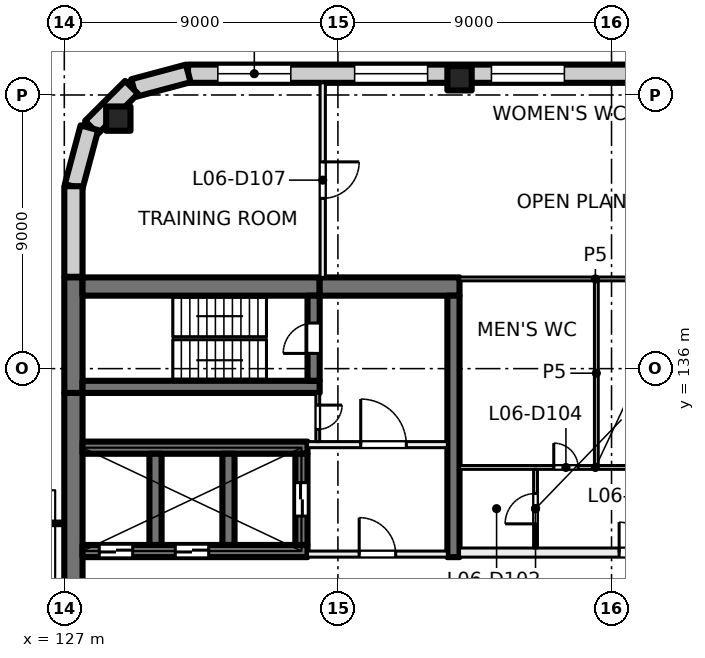
"""IFC4 building model, lengths in metres.
Left out: names, types, materials, properties, quantities, classifications, styles, units other than length and angle.
Written with IfcOpenShell. Run it as: python <this file> out.ifc"""

import sys

from ifc_helpers import new_model, si_unit, direction, frame, frame_2d, origin, origin_2d, place, context, subcontext, project, spatial, rectangle, extrude, element, fill, save


model = new_model("IFC4")
c1 = context("Model", 3, precision=1e-05, world=origin(), true_north=direction((0.0, 1.0)))
c2 = subcontext(c1, "Body", "Model", "MODEL_VIEW")
j1 = project(units=[si_unit("LENGTHUNIT", "METRE"), si_unit("PLANEANGLEUNIT", "RADIAN")], contexts=[c1])
p1 = place(None, origin())
s1 = spatial("IfcSite", under=j1, at=p1, CompositionType="ELEMENT")
p2 = place(p1, origin())
s2 = spatial("IfcBuilding", under=s1, at=p2, CompositionType="ELEMENT")
p3 = place(p2, frame((0.0, 0.0, 31.5)))
s3 = spatial("IfcBuildingStorey", under=s2, at=p3, CompositionType="ELEMENT", Elevation=31.5)
for number, where, z_axis, x_axis in (
    (1, (128.777, 144.223, 0.0), (0.0, 0.0, 1.0), (1.0, 0.0, 0.0)),
    (2, (140.0, 145.55, 0.0), (0.0, 0.0, 1.0), (1.0, 0.0, 0.0)),
):
    element("IfcColumn", number, at=place(p3, frame(where, z_axis=z_axis, x_axis=x_axis)), inside=s3, PredefinedType="COLUMN", context=c2, shape_type="SweptSolid", body=[
        extrude(rectangle(XDim=0.8, YDim=0.8, at=origin_2d()), origin(), (0.0, 0.0, 1.0), 4.0),
    ])
p4 = place(p3, frame((127.3, 120.8, 0.0), z_axis=(0.0, 0.0, 1.0), x_axis=(0.0, 1.0, 0.0)))
e3 = element("IfcWall", 3, at=p4, inside=s3, PredefinedType="SHEAR", context=c2, shape_type="SweptSolid", body=[
    extrude(rectangle(XDim=14.4, YDim=0.6, at=frame_2d((7.2, 0.0))), origin(), (0.0, 0.0, 1.0), 4.0),
])
p5 = place(p4, frame((6.3, 0.0, 0.0)))
e4 = element("IfcOpeningElement", 4, at=p5, cuts=e3, PredefinedType="OPENING", context=c2, shape_type="SweptSolid", body=[
    extrude(rectangle(XDim=1.8, YDim=2.1, at=frame_2d((0.9, 1.05))), frame((0.0, 0.31, 0.0), z_axis=(0.0, -1.0, 0.0), x_axis=(1.0, 0.0, 0.0)), (0.0, 0.0, 1.0), 0.62),
])
p6 = place(p3, frame((127.3, 135.2, 0.0), z_axis=(0.0, 0.0, 1.0), x_axis=(0.0, 1.0, 0.0)))
e5 = element("IfcWall", 5, at=p6, inside=s3, PredefinedType="SHEAR", context=c2, shape_type="SweptSolid", body=[
    extrude(rectangle(XDim=3.8, YDim=0.6, at=frame_2d((1.9, 0.0))), origin(), (0.0, 0.0, 1.0), 4.0),
])
p7 = place(p3, frame((127.6, 138.7, 0.0), z_axis=(0.0, 0.0, 1.0), x_axis=(1.0, 0.0, 0.0)))
e6 = element("IfcWall", 6, at=p7, inside=s3, PredefinedType="SHEAR", context=c2, shape_type="SweptSolid", body=[
    extrude(rectangle(XDim=7.8, YDim=0.6, at=frame_2d((3.9, 0.0))), origin(), (0.0, 0.0, 1.0), 4.0),
])
p8 = place(p3, frame((135.4, 138.7, 0.0), z_axis=(0.0, 0.0, 1.0), x_axis=(1.0, 0.0, 0.0)))
e7 = element("IfcWall", 7, at=p8, inside=s3, PredefinedType="SHEAR", context=c2, shape_type="SweptSolid", body=[
    extrude(rectangle(XDim=4.6, YDim=0.6, at=frame_2d((2.3, 0.0))), origin(), (0.0, 0.0, 1.0), 4.0),
])
p9 = place(p3, frame((127.6, 135.4, 0.0), z_axis=(0.0, 0.0, 1.0), x_axis=(1.0, 0.0, 0.0)))
e8 = element("IfcWall", 8, at=p9, inside=s3, PredefinedType="SHEAR", context=c2, shape_type="SweptSolid", body=[
    extrude(rectangle(XDim=7.8, YDim=0.4, at=frame_2d((3.9, 0.0))), origin(), (0.0, 0.0, 1.0), 4.0),
])
p10 = place(p3, frame((135.2, 135.6, 0.0), z_axis=(0.0, 0.0, 1.0), x_axis=(0.0, 1.0, 0.0)))
e9 = element("IfcWall", 9, at=p10, inside=s3, PredefinedType="SHEAR", context=c2, shape_type="SweptSolid", body=[
    extrude(rectangle(XDim=2.8, YDim=0.4, at=frame_2d((1.4, 0.0))), origin(), (0.0, 0.0, 1.0), 4.0),
])
p11 = place(p10, frame((0.9, 0.0, 0.0)))
e10 = element("IfcOpeningElement", 10, at=p11, cuts=e9, PredefinedType="OPENING", context=c2, shape_type="SweptSolid", body=[
    extrude(rectangle(XDim=1.0, YDim=2.1, at=frame_2d((0.5, 1.05))), frame((0.0, 0.21, 0.0), z_axis=(0.0, -1.0, 0.0), x_axis=(1.0, 0.0, 0.0)), (0.0, 0.0, 1.0), 0.42),
])
p12 = place(p3, frame((127.6, 130.0, 0.0), z_axis=(0.0, 0.0, 1.0), x_axis=(1.0, 0.0, 0.0)))
e11 = element("IfcWall", 11, at=p12, inside=s3, PredefinedType="SHEAR", context=c2, shape_type="SweptSolid", body=[
    extrude(rectangle(XDim=7.4, YDim=0.4, at=frame_2d((3.7, 0.0))), origin(), (0.0, 0.0, 1.0), 4.0),
])
p13 = place(p12, frame((0.55, 0.0, 0.0)))
e12 = element("IfcOpeningElement", 12, at=p13, cuts=e11, PredefinedType="OPENING", context=c2, shape_type="SweptSolid", body=[
    extrude(rectangle(XDim=1.1, YDim=2.1, at=frame_2d((0.55, 1.05))), frame((0.0, 0.21, 0.0), z_axis=(0.0, -1.0, 0.0), x_axis=(1.0, 0.0, 0.0)), (0.0, 0.0, 1.0), 0.42),
])
p14 = place(p12, frame((3.05, 0.0, 0.0)))
e13 = element("IfcOpeningElement", 13, at=p14, cuts=e11, PredefinedType="OPENING", context=c2, shape_type="SweptSolid", body=[
    extrude(rectangle(XDim=1.1, YDim=2.1, at=frame_2d((0.55, 1.05))), frame((0.0, 0.21, 0.0), z_axis=(0.0, -1.0, 0.0), x_axis=(1.0, 0.0, 0.0)), (0.0, 0.0, 1.0), 0.42),
])
p15 = place(p3, frame((127.6, 133.4, 0.0), z_axis=(0.0, 0.0, 1.0), x_axis=(1.0, 0.0, 0.0)))
e14 = element("IfcWall", 14, at=p15, inside=s3, PredefinedType="SHEAR", context=c2, shape_type="SweptSolid", body=[
    extrude(rectangle(XDim=7.4, YDim=0.4, at=frame_2d((3.7, 0.0))), origin(), (0.0, 0.0, 1.0), 4.0),
])
for number, where, z_axis, x_axis in (
    (15, (130.0, 130.2, 0.0), (0.0, 0.0, 1.0), (0.0, 1.0, 0.0)),
    (16, (132.4, 130.2, 0.0), (0.0, 0.0, 1.0), (0.0, 1.0, 0.0)),
):
    element("IfcWall", number, at=place(p3, frame(where, z_axis=z_axis, x_axis=x_axis)), inside=s3, PredefinedType="SHEAR", context=c2, shape_type="SweptSolid", body=[
        extrude(rectangle(XDim=3.0, YDim=0.4, at=frame_2d((1.5, 0.0))), origin(), (0.0, 0.0, 1.0), 4.0),
    ])
p16 = place(p3, frame((134.8, 130.2, 0.0), z_axis=(0.0, 0.0, 1.0), x_axis=(0.0, 1.0, 0.0)))
e17 = element("IfcWall", 17, at=p16, inside=s3, PredefinedType="SHEAR", context=c2, shape_type="SweptSolid", body=[
    extrude(rectangle(XDim=3.0, YDim=0.4, at=frame_2d((1.5, 0.0))), origin(), (0.0, 0.0, 1.0), 4.0),
])
p17 = place(p16, frame((0.95, 0.0, 0.0)))
e18 = element("IfcOpeningElement", 18, at=p17, cuts=e17, PredefinedType="OPENING", context=c2, shape_type="SweptSolid", body=[
    extrude(rectangle(XDim=1.1, YDim=2.1, at=frame_2d((0.55, 1.05))), frame((0.0, 0.21, 0.0), z_axis=(0.0, -1.0, 0.0), x_axis=(1.0, 0.0, 0.0)), (0.0, 0.0, 1.0), 0.42),
])
p18 = place(p3, frame((139.8, 129.8, 0.0), z_axis=(0.0, 0.0, 1.0), x_axis=(0.0, 1.0, 0.0)))
e19 = element("IfcWall", 19, at=p18, inside=s3, PredefinedType="SHEAR", context=c2, shape_type="SweptSolid", body=[
    extrude(rectangle(XDim=8.6, YDim=0.4, at=frame_2d((4.3, 0.0))), origin(), (0.0, 0.0, 1.0), 4.0),
])
p19 = place(p3, frame((131.07, 145.7, 0.0), z_axis=(0.0, 0.0, 1.0), x_axis=(1.0, 0.0, 0.0)))
e20 = element("IfcWall", 20, at=p19, inside=s3, PredefinedType="SOLIDWALL", context=c2, shape_type="SweptSolid", body=[
    extrude(rectangle(XDim=31.93, YDim=0.6, at=frame_2d((15.965, 0.0))), origin(), (0.0, 0.0, 1.0), 3.625),
])
p20 = place(p19, frame((0.98, 0.0, 0.9)))
e21 = element("IfcOpeningElement", 21, at=p20, cuts=e20, PredefinedType="OPENING", context=c2, shape_type="SweptSolid", body=[
    extrude(rectangle(XDim=2.4, YDim=2.4, at=frame_2d((1.2, 1.2))), frame((0.0, 0.31, 0.0), z_axis=(0.0, -1.0, 0.0), x_axis=(1.0, 0.0, 0.0)), (0.0, 0.0, 1.0), 0.62),
])
p21 = place(p19, frame((5.48, 0.0, 0.9)))
e22 = element("IfcOpeningElement", 22, at=p21, cuts=e20, PredefinedType="OPENING", context=c2, shape_type="SweptSolid", body=[
    extrude(rectangle(XDim=2.4, YDim=2.4, at=frame_2d((1.2, 1.2))), frame((0.0, 0.31, 0.0), z_axis=(0.0, -1.0, 0.0), x_axis=(1.0, 0.0, 0.0)), (0.0, 0.0, 1.0), 0.62),
])
p22 = place(p19, frame((9.98, 0.0, 0.9)))
e23 = element("IfcOpeningElement", 23, at=p22, cuts=e20, PredefinedType="OPENING", context=c2, shape_type="SweptSolid", body=[
    extrude(rectangle(XDim=2.4, YDim=2.4, at=frame_2d((1.2, 1.2))), frame((0.0, 0.31, 0.0), z_axis=(0.0, -1.0, 0.0), x_axis=(1.0, 0.0, 0.0)), (0.0, 0.0, 1.0), 0.62),
])
p23 = place(p19, frame((14.48, 0.0, 0.9)))
e24 = element("IfcOpeningElement", 24, at=p23, cuts=e20, PredefinedType="OPENING", context=c2, shape_type="SweptSolid", body=[
    extrude(rectangle(XDim=2.4, YDim=2.4, at=frame_2d((1.2, 1.2))), frame((0.0, 0.31, 0.0), z_axis=(0.0, -1.0, 0.0), x_axis=(1.0, 0.0, 0.0)), (0.0, 0.0, 1.0), 0.62),
])
p24 = place(p19, frame((18.98, 0.0, 0.9)))
e25 = element("IfcOpeningElement", 25, at=p24, cuts=e20, PredefinedType="OPENING", context=c2, shape_type="SweptSolid", body=[
    extrude(rectangle(XDim=2.4, YDim=2.4, at=frame_2d((1.2, 1.2))), frame((0.0, 0.31, 0.0), z_axis=(0.0, -1.0, 0.0), x_axis=(1.0, 0.0, 0.0)), (0.0, 0.0, 1.0), 0.62),
])
p25 = place(p19, frame((23.48, 0.0, 0.9)))
e26 = element("IfcOpeningElement", 26, at=p25, cuts=e20, PredefinedType="OPENING", context=c2, shape_type="SweptSolid", body=[
    extrude(rectangle(XDim=2.4, YDim=2.4, at=frame_2d((1.2, 1.2))), frame((0.0, 0.31, 0.0), z_axis=(0.0, -1.0, 0.0), x_axis=(1.0, 0.0, 0.0)), (0.0, 0.0, 1.0), 0.62),
])
p26 = place(p19, frame((27.98, 0.0, 0.9)))
e27 = element("IfcOpeningElement", 27, at=p26, cuts=e20, PredefinedType="OPENING", context=c2, shape_type="SweptSolid", body=[
    extrude(rectangle(XDim=2.4, YDim=2.4, at=frame_2d((1.2, 1.2))), frame((0.0, 0.31, 0.0), z_axis=(0.0, -1.0, 0.0), x_axis=(1.0, 0.0, 0.0)), (0.0, 0.0, 1.0), 0.62),
])
for number, where, z_axis, x_axis in (
    (28, (129.281, 145.229, 0.0), (0.0, 0.0, 1.0), (0.966, 0.259, 0.0)),
    (29, (127.896, 143.936, 0.0), (0.0, 0.0, 1.0), (0.707, 0.707, 0.0)),
):
    element("IfcWall", number, at=place(p3, frame(where, z_axis=z_axis, x_axis=x_axis)), inside=s3, PredefinedType="SOLIDWALL", context=c2, shape_type="SweptSolid", body=[
        extrude(rectangle(XDim=1.861, YDim=0.6, at=frame_2d((0.93, 0.0))), origin(), (0.0, 0.0, 1.0), 3.625),
    ])
p27 = place(p3, frame((127.308, 141.99, 0.0), z_axis=(0.0, 0.0, 1.0), x_axis=(0.258839784042, 0.965920269068, 0.0)))
e30 = element("IfcWall", 30, at=p27, inside=s3, PredefinedType="SOLIDWALL", context=c2, shape_type="SweptSolid", body=[
    extrude(rectangle(XDim=2.0, YDim=0.6, at=frame_2d((1.0, 0.0))), origin(), (0.0, 0.0, 1.0), 3.625),
])
p28 = place(p3, frame((127.3, 139.02, 0.0), z_axis=(0.0, 0.0, 1.0), x_axis=(0.0, 1.0, 0.0)))
e31 = element("IfcWall", 31, at=p28, inside=s3, PredefinedType="SOLIDWALL", context=c2, shape_type="SweptSolid", body=[
    extrude(rectangle(XDim=2.98, YDim=0.6, at=frame_2d((1.49, 0.0))), origin(), (0.0, 0.0, 1.0), 3.625),
])
p29 = place(p3, frame((135.0, 129.9, 0.0), z_axis=(0.0, 0.0, 1.0), x_axis=(1.0, 0.0, 0.0)))
e32 = element("IfcWall", 32, at=p29, inside=s3, PredefinedType="PARTITIONING", context=c2, shape_type="SweptSolid", body=[
    extrude(rectangle(XDim=4.6, YDim=0.2, at=frame_2d((2.3, 0.0))), origin(), (0.0, 0.0, 1.0), 3.625),
])
p30 = place(p29, frame((1.7, 0.0, 0.0)))
e33 = element("IfcOpeningElement", 33, at=p30, cuts=e32, PredefinedType="OPENING", context=c2, shape_type="SweptSolid", body=[
    extrude(rectangle(XDim=1.2, YDim=2.1, at=frame_2d((0.6, 1.05))), frame((0.0, 0.11, 0.0), z_axis=(0.0, -1.0, 0.0), x_axis=(1.0, 0.0, 0.0)), (0.0, 0.0, 1.0), 0.22),
])
p31 = place(p3, frame((135.0, 133.5, 0.0), z_axis=(0.0, 0.0, 1.0), x_axis=(1.0, 0.0, 0.0)))
e34 = element("IfcWall", 34, at=p31, inside=s3, PredefinedType="PARTITIONING", context=c2, shape_type="SweptSolid", body=[
    extrude(rectangle(XDim=4.6, YDim=0.2, at=frame_2d((2.3, 0.0))), origin(), (0.0, 0.0, 1.0), 3.625),
])
p32 = place(p31, frame((1.75, 0.0, 0.0)))
e35 = element("IfcOpeningElement", 35, at=p32, cuts=e34, PredefinedType="OPENING", context=c2, shape_type="SweptSolid", body=[
    extrude(rectangle(XDim=1.5, YDim=2.1, at=frame_2d((0.75, 1.05))), frame((0.0, 0.11, 0.0), z_axis=(0.0, -1.0, 0.0), x_axis=(1.0, 0.0, 0.0)), (0.0, 0.0, 1.0), 0.22),
])
p33 = place(p3, frame((135.337, 135.2, 0.0), z_axis=(0.0, 0.0, 1.0), x_axis=(0.0, -1.0, 0.0)))
e36 = element("IfcWall", 36, at=p33, inside=s3, PredefinedType="PARTITIONING", context=c2, shape_type="SweptSolid", body=[
    extrude(rectangle(XDim=1.6, YDim=0.125, at=frame_2d((0.8, 0.0))), origin(), (0.0, 0.0, 1.0), 3.625),
])
p34 = place(p33, frame((0.4, 0.0, 0.0)))
e37 = element("IfcOpeningElement", 37, at=p34, cuts=e36, PredefinedType="OPENING", context=c2, shape_type="SweptSolid", body=[
    extrude(rectangle(XDim=0.8, YDim=2.1, at=frame_2d((0.4, 1.05))), frame((0.0, 0.073, 0.0), z_axis=(0.0, -1.0, 0.0), x_axis=(1.0, 0.0, 0.0)), (0.0, 0.0, 1.0), 0.145),
])
p35 = place(p3, frame((135.5, 145.4, 0.0), z_axis=(0.0, 0.0, 1.0), x_axis=(0.0, -1.0, 0.0)))
e38 = element("IfcWall", 38, at=p35, inside=s3, PredefinedType="PARTITIONING", context=c2, shape_type="SweptSolid", body=[
    extrude(rectangle(XDim=6.4, YDim=0.175, at=frame_2d((3.2, 0.0))), origin(), (0.0, 0.0, 1.0), 3.625),
])
p36 = place(p35, frame((2.6, 0.0, 0.0)))
e39 = element("IfcOpeningElement", 39, at=p36, cuts=e38, PredefinedType="OPENING", context=c2, shape_type="SweptSolid", body=[
    extrude(rectangle(XDim=1.2, YDim=2.1, at=frame_2d((0.6, 1.05))), frame((0.0, 0.097, 0.0), z_axis=(0.0, -1.0, 0.0), x_axis=(1.0, 0.0, 0.0)), (0.0, 0.0, 1.0), 0.195),
])
p37 = place(p3, frame((140.0, 129.95, 0.0), z_axis=(0.0, 0.0, 1.0), x_axis=(1.0, 0.0, 0.0)))
e40 = element("IfcWall", 40, at=p37, inside=s3, PredefinedType="PARTITIONING", context=c2, shape_type="SweptSolid", body=[
    extrude(rectangle(XDim=14.0, YDim=0.3, at=frame_2d((7.0, 0.0))), origin(), (0.0, 0.0, 1.0), 3.625),
])
p38 = place(p37, frame((5.25, 0.0, 0.0)))
e41 = element("IfcOpeningElement", 41, at=p38, cuts=e40, PredefinedType="OPENING", context=c2, shape_type="SweptSolid", body=[
    extrude(rectangle(XDim=1.0, YDim=2.1, at=frame_2d((0.5, 1.05))), frame((0.0, 0.16, 0.0), z_axis=(0.0, -1.0, 0.0), x_axis=(1.0, 0.0, 0.0)), (0.0, 0.0, 1.0), 0.32),
])
p39 = place(p37, frame((10.6, 0.0, 0.0)))
e42 = element("IfcOpeningElement", 42, at=p39, cuts=e40, PredefinedType="OPENING", context=c2, shape_type="SweptSolid", body=[
    extrude(rectangle(XDim=1.8, YDim=2.1, at=frame_2d((0.9, 1.05))), frame((0.0, 0.16, 0.0), z_axis=(0.0, -1.0, 0.0), x_axis=(1.0, 0.0, 0.0)), (0.0, 0.0, 1.0), 0.32),
])
p40 = place(p3, frame((140.0, 132.75, 0.0), z_axis=(0.0, 0.0, 1.0), x_axis=(1.0, 0.0, 0.0)))
e43 = element("IfcWall", 43, at=p40, inside=s3, PredefinedType="PARTITIONING", context=c2, shape_type="SweptSolid", body=[
    extrude(rectangle(XDim=8.938, YDim=0.125, at=frame_2d((4.469, 0.0))), origin(), (0.0, 0.0, 1.0), 3.625),
])
p41 = place(p40, frame((6.329, 0.0, 0.0)))
e44 = element("IfcOpeningElement", 44, at=p41, cuts=e43, PredefinedType="OPENING", context=c2, shape_type="SweptSolid", body=[
    extrude(rectangle(XDim=0.8, YDim=2.1, at=frame_2d((0.4, 1.05))), frame((0.0, 0.073, 0.0), z_axis=(0.0, -1.0, 0.0), x_axis=(1.0, 0.0, 0.0)), (0.0, 0.0, 1.0), 0.145),
])
p42 = place(p40, frame((3.1, 0.0, 0.0)))
e45 = element("IfcOpeningElement", 45, at=p42, cuts=e43, PredefinedType="OPENING", context=c2, shape_type="SweptSolid", body=[
    extrude(rectangle(XDim=0.8, YDim=2.1, at=frame_2d((0.4, 1.05))), frame((0.0, 0.073, 0.0), z_axis=(0.0, -1.0, 0.0), x_axis=(1.0, 0.0, 0.0)), (0.0, 0.0, 1.0), 0.145),
])
p43 = place(p3, frame((140.0, 138.95, 0.0), z_axis=(0.0, 0.0, 1.0), x_axis=(1.0, 0.0, 0.0)))
e46 = element("IfcWall", 46, at=p43, inside=s3, PredefinedType="PARTITIONING", context=c2, shape_type="SweptSolid", body=[
    extrude(rectangle(XDim=8.938, YDim=0.125, at=frame_2d((4.469, 0.0))), origin(), (0.0, 0.0, 1.0), 3.625),
])
p44 = place(p3, frame((142.5, 130.1, 0.0), z_axis=(0.0, 0.0, 1.0), x_axis=(0.0, 1.0, 0.0)))
e47 = element("IfcWall", 47, at=p44, inside=s3, PredefinedType="PARTITIONING", context=c2, shape_type="SweptSolid", body=[
    extrude(rectangle(XDim=2.588, YDim=0.125, at=frame_2d((1.294, 0.0))), origin(), (0.0, 0.0, 1.0), 3.625),
])
p45 = place(p44, frame((0.794, 0.0, 0.0)))
e48 = element("IfcOpeningElement", 48, at=p45, cuts=e47, PredefinedType="OPENING", context=c2, shape_type="SweptSolid", body=[
    extrude(rectangle(XDim=1.0, YDim=2.1, at=frame_2d((0.5, 1.05))), frame((0.0, 0.073, 0.0), z_axis=(0.0, -1.0, 0.0), x_axis=(1.0, 0.0, 0.0)), (0.0, 0.0, 1.0), 0.145),
])
p46 = place(p3, frame((144.5, 138.888, 0.0), z_axis=(0.0, 0.0, 1.0), x_axis=(0.0, -1.0, 0.0)))
e49 = element("IfcWall", 49, at=p46, inside=s3, PredefinedType="PARTITIONING", context=c2, shape_type="SweptSolid", body=[
    extrude(rectangle(XDim=6.076, YDim=0.125, at=frame_2d((3.038, 0.0))), origin(), (0.0, 0.0, 1.0), 3.625),
])
p47 = place(p20, origin())
e50 = element("IfcWindow", 50, at=p47, inside=s3, PartitioningType="SINGLE_PANEL", PredefinedType="WINDOW", context=c2, shape_type="SweptSolid", body=[
    extrude(rectangle(XDim=2.4, YDim=2.4, at=frame_2d((1.2, 1.2))), frame((0.0, 0.03, 0.0), z_axis=(0.0, -1.0, 0.0), x_axis=(1.0, 0.0, 0.0)), (0.0, 0.0, 1.0), 0.06),
])
fill(e21, e50)
p48 = place(p21, origin())
e51 = element("IfcWindow", 51, at=p48, inside=s3, PartitioningType="SINGLE_PANEL", PredefinedType="WINDOW", context=c2, shape_type="SweptSolid", body=[
    extrude(rectangle(XDim=2.4, YDim=2.4, at=frame_2d((1.2, 1.2))), frame((0.0, 0.03, 0.0), z_axis=(0.0, -1.0, 0.0), x_axis=(1.0, 0.0, 0.0)), (0.0, 0.0, 1.0), 0.06),
])
fill(e22, e51)
p49 = place(p22, origin())
e52 = element("IfcWindow", 52, at=p49, inside=s3, PartitioningType="SINGLE_PANEL", PredefinedType="WINDOW", context=c2, shape_type="SweptSolid", body=[
    extrude(rectangle(XDim=2.4, YDim=2.4, at=frame_2d((1.2, 1.2))), frame((0.0, 0.03, 0.0), z_axis=(0.0, -1.0, 0.0), x_axis=(1.0, 0.0, 0.0)), (0.0, 0.0, 1.0), 0.06),
])
fill(e23, e52)
p50 = place(p13, origin())
e53 = element("IfcDoor", 53, at=p50, inside=s3, OperationType="DOUBLE_DOOR_SLIDING", PredefinedType="DOOR", context=c2, shape_type="SweptSolid", body=[
    extrude(rectangle(XDim=1.1, YDim=2.1, at=frame_2d((0.55, 1.05))), frame((0.0, 0.025, 0.0), z_axis=(0.0, -1.0, 0.0), x_axis=(1.0, 0.0, 0.0)), (0.0, 0.0, 1.0), 0.05),
])
fill(e12, e53)
p51 = place(p14, origin())
e54 = element("IfcDoor", 54, at=p51, inside=s3, OperationType="DOUBLE_DOOR_SLIDING", PredefinedType="DOOR", context=c2, shape_type="SweptSolid", body=[
    extrude(rectangle(XDim=1.1, YDim=2.1, at=frame_2d((0.55, 1.05))), frame((0.0, 0.025, 0.0), z_axis=(0.0, -1.0, 0.0), x_axis=(1.0, 0.0, 0.0)), (0.0, 0.0, 1.0), 0.05),
])
fill(e13, e54)
p52 = place(p30, origin())
e55 = element("IfcDoor", 55, at=p52, inside=s3, OperationType="DOUBLE_DOOR_SINGLE_SWING", PredefinedType="DOOR", context=c2, shape_type="SweptSolid", body=[
    extrude(rectangle(XDim=1.2, YDim=2.1, at=frame_2d((0.6, 1.05))), frame((0.0, 0.025, 0.0), z_axis=(0.0, -1.0, 0.0), x_axis=(1.0, 0.0, 0.0)), (0.0, 0.0, 1.0), 0.05),
])
fill(e33, e55)
p53 = place(p32, origin())
e56 = element("IfcDoor", 56, at=p53, inside=s3, OperationType="DOUBLE_DOOR_SINGLE_SWING", PredefinedType="DOOR", context=c2, shape_type="SweptSolid", body=[
    extrude(rectangle(XDim=1.5, YDim=2.1, at=frame_2d((0.75, 1.05))), frame((0.0, 0.025, 0.0), z_axis=(0.0, -1.0, 0.0), x_axis=(1.0, 0.0, 0.0)), (0.0, 0.0, 1.0), 0.05),
])
fill(e35, e56)
p54 = place(p11, origin())
e57 = element("IfcDoor", 57, at=p54, inside=s3, OperationType="SINGLE_SWING_LEFT", PredefinedType="DOOR", context=c2, shape_type="SweptSolid", body=[
    extrude(rectangle(XDim=1.0, YDim=2.1, at=frame_2d((0.5, 1.05))), frame((0.0, 0.025, 0.0), z_axis=(0.0, -1.0, 0.0), x_axis=(1.0, 0.0, 0.0)), (0.0, 0.0, 1.0), 0.05),
])
fill(e10, e57)
p55 = place(p34, origin())
e58 = element("IfcDoor", 58, at=p55, inside=s3, OperationType="SINGLE_SWING_RIGHT", PredefinedType="DOOR", context=c2, shape_type="SweptSolid", body=[
    extrude(rectangle(XDim=0.8, YDim=2.1, at=frame_2d((0.4, 1.05))), frame((0.0, 0.025, 0.0), z_axis=(0.0, -1.0, 0.0), x_axis=(1.0, 0.0, 0.0)), (0.0, 0.0, 1.0), 0.05),
])
fill(e37, e58)
p56 = place(p17, origin())
e59 = element("IfcDoor", 59, at=p56, inside=s3, OperationType="DOUBLE_DOOR_SLIDING", PredefinedType="DOOR", context=c2, shape_type="SweptSolid", body=[
    extrude(rectangle(XDim=1.1, YDim=2.1, at=frame_2d((0.55, 1.05))), frame((0.0, 0.025, 0.0), z_axis=(0.0, -1.0, 0.0), x_axis=(1.0, 0.0, 0.0)), (0.0, 0.0, 1.0), 0.05),
])
fill(e18, e59)
p57 = place(p38, origin())
e60 = element("IfcDoor", 60, at=p57, inside=s3, OperationType="SINGLE_SWING_RIGHT", PredefinedType="DOOR", context=c2, shape_type="SweptSolid", body=[
    extrude(rectangle(XDim=1.0, YDim=2.1, at=frame_2d((0.5, 1.05))), frame((0.0, 0.025, 0.0), z_axis=(0.0, -1.0, 0.0), x_axis=(1.0, 0.0, 0.0)), (0.0, 0.0, 1.0), 0.05),
])
fill(e41, e60)
p58 = place(p45, origin())
e61 = element("IfcDoor", 61, at=p58, inside=s3, OperationType="SINGLE_SWING_RIGHT", PredefinedType="DOOR", context=c2, shape_type="SweptSolid", body=[
    extrude(rectangle(XDim=1.0, YDim=2.1, at=frame_2d((0.5, 1.05))), frame((0.0, 0.025, 0.0), z_axis=(0.0, -1.0, 0.0), x_axis=(1.0, 0.0, 0.0)), (0.0, 0.0, 1.0), 0.05),
])
fill(e48, e61)
p59 = place(p42, origin())
e62 = element("IfcDoor", 62, at=p59, inside=s3, OperationType="SINGLE_SWING_LEFT", PredefinedType="DOOR", context=c2, shape_type="SweptSolid", body=[
    extrude(rectangle(XDim=0.8, YDim=2.1, at=frame_2d((0.4, 1.05))), frame((0.0, 0.025, 0.0), z_axis=(0.0, -1.0, 0.0), x_axis=(1.0, 0.0, 0.0)), (0.0, 0.0, 1.0), 0.05),
])
fill(e45, e62)
p60 = place(p36, origin())
e63 = element("IfcDoor", 63, at=p60, inside=s3, OperationType="DOUBLE_DOOR_SINGLE_SWING", PredefinedType="DOOR", context=c2, shape_type="SweptSolid", body=[
    extrude(rectangle(XDim=1.2, YDim=2.1, at=frame_2d((0.6, 1.05))), frame((0.0, 0.025, 0.0), z_axis=(0.0, -1.0, 0.0), x_axis=(1.0, 0.0, 0.0)), (0.0, 0.0, 1.0), 0.05),
])
fill(e39, e63)
save(model, sys.argv[1])
